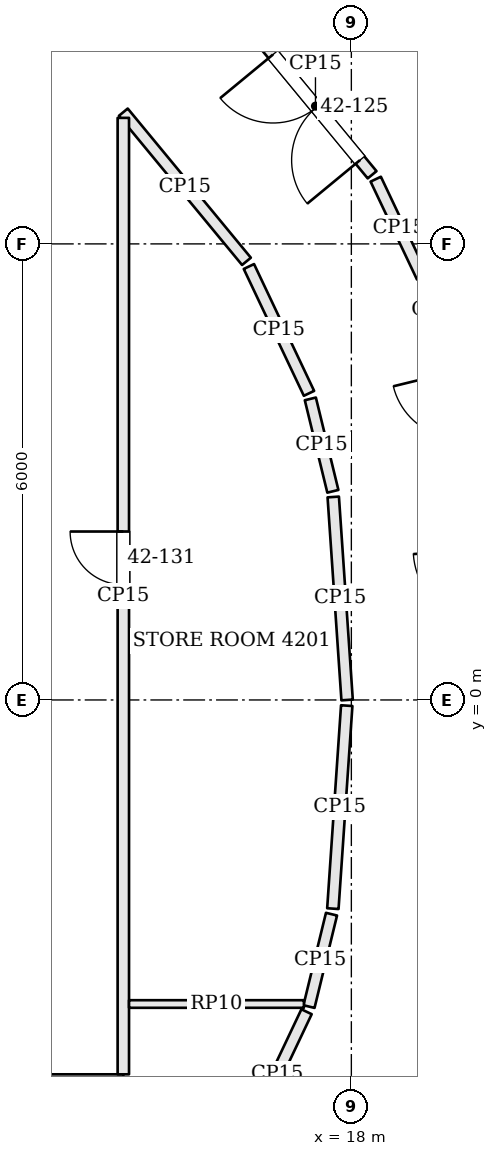
"""IFC4 building model, lengths in metres.
Left out: names, types, materials, properties, quantities, classifications, styles, units other than length and angle.
Written with IfcOpenShell. Run it as: python <this file> out.ifc"""

import sys

from ifc_helpers import new_model, si_unit, direction, frame, frame_2d, origin, place, context, subcontext, project, spatial, rectangle, extrude, element, fill, save


model = new_model("IFC4")
c1 = context("Model", 3, precision=1e-05, world=origin(), true_north=direction((0.0, 1.0)))
c2 = subcontext(c1, "Body", "Model", "MODEL_VIEW")
j1 = project(units=[si_unit("LENGTHUNIT", "METRE"), si_unit("PLANEANGLEUNIT", "RADIAN")], contexts=[c1])
p1 = place(None, origin())
s1 = spatial("IfcSite", under=j1, at=p1, CompositionType="ELEMENT")
p2 = place(p1, origin())
s2 = spatial("IfcBuilding", under=s1, at=p2, CompositionType="ELEMENT")
p3 = place(p2, frame((0.0, 0.0, 174.0)))
s3 = spatial("IfcBuildingStorey", under=s2, at=p3, CompositionType="ELEMENT", Elevation=174.0)
p4 = place(p3, frame((18.931, 5.563, 0.0), z_axis=(0.0, 0.0, 1.0), x_axis=(-0.428204145682, 0.903682029046, 0.0)))
e1 = element("IfcWall", 1, at=p4, inside=s3, PredefinedType="PARTITIONING", context=c2, shape_type="SweptSolid", body=[
    extrude(rectangle(XDim=1.425, YDim=0.15, at=frame_2d((0.713, 0.0))), origin(), (0.0, 0.0, 1.0), 3.084),
])
p5 = place(p3, frame((18.273, 6.909, 0.0), z_axis=(0.0, 0.0, 1.0), x_axis=(-0.63653648943, 0.771246586783, 0.0)))
e2 = element("IfcWall", 2, at=p5, inside=s3, PredefinedType="PARTITIONING", context=c2, shape_type="SweptSolid", body=[
    extrude(rectangle(XDim=2.342, YDim=0.15, at=frame_2d((1.171, 0.0))), origin(), (0.0, 0.0, 1.0), 3.084),
])
p6 = place(p5, frame((0.25, 0.0, 0.0)))
e3 = element("IfcOpeningElement", 3, at=p6, cuts=e2, PredefinedType="OPENING", context=c2, shape_type="SweptSolid", body=[
    extrude(rectangle(XDim=1.8, YDim=2.1, at=frame_2d((0.9, 1.05))), frame((0.0, 0.085, 0.0), z_axis=(0.0, -1.0, 0.0), x_axis=(1.0, 0.0, 0.0)), (0.0, 0.0, 1.0), 0.17),
])
p7 = place(p3, frame((15.0, 7.733, 0.0), z_axis=(0.0, 0.0, 1.0), x_axis=(0.636601263488, -0.771193121938, 0.0)))
e4 = element("IfcWall", 4, at=p7, inside=s3, PredefinedType="PARTITIONING", context=c2, shape_type="SweptSolid", body=[
    extrude(rectangle(XDim=2.545, YDim=0.15, at=frame_2d((1.272, 0.0))), origin(), (0.0, 0.0, 1.0), 3.084),
])
p8 = place(p3, frame((16.652, 5.702, 0.0), z_axis=(0.0, 0.0, 1.0), x_axis=(0.428126129773, -0.903718992279, 0.0)))
e5 = element("IfcWall", 5, at=p8, inside=s3, PredefinedType="PARTITIONING", context=c2, shape_type="SweptSolid", body=[
    extrude(rectangle(XDim=1.846, YDim=0.15, at=frame_2d((0.923, 0.0))), origin(), (0.0, 0.0, 1.0), 3.084),
])
p9 = place(p3, frame((17.46, 3.961, 0.0), z_axis=(0.0, 0.0, 1.0), x_axis=(0.236655249498, -0.971593687137, 0.0)))
e6 = element("IfcWall", 6, at=p9, inside=s3, PredefinedType="PARTITIONING", context=c2, shape_type="SweptSolid", body=[
    extrude(rectangle(XDim=1.251, YDim=0.15, at=frame_2d((0.626, 0.0))), origin(), (0.0, 0.0, 1.0), 3.084),
])
p10 = place(p3, frame((17.762, 2.67, 0.0), z_axis=(0.0, 0.0, 1.0), x_axis=(0.068135311644, -0.997676089373, 0.0)))
e7 = element("IfcWall", 7, at=p10, inside=s3, PredefinedType="PARTITIONING", context=c2, shape_type="SweptSolid", body=[
    extrude(rectangle(XDim=2.677, YDim=0.15, at=frame_2d((1.338, 0.0))), origin(), (0.0, 0.0, 1.0), 3.084),
])
p11 = place(p3, frame((17.939, -0.075, 0.0), z_axis=(0.0, 0.0, 1.0), x_axis=(-0.068226099283, -0.99766988497, 0.0)))
e8 = element("IfcWall", 8, at=p11, inside=s3, PredefinedType="PARTITIONING", context=c2, shape_type="SweptSolid", body=[
    extrude(rectangle(XDim=2.677, YDim=0.15, at=frame_2d((1.338, 0.0))), origin(), (0.0, 0.0, 1.0), 3.084),
])
p12 = place(p3, frame((17.739, -2.818, 0.0), z_axis=(0.0, 0.0, 1.0), x_axis=(-0.236884307907, -0.971537865792, 0.0)))
e9 = element("IfcWall", 9, at=p12, inside=s3, PredefinedType="PARTITIONING", context=c2, shape_type="SweptSolid", body=[
    extrude(rectangle(XDim=1.251, YDim=0.15, at=frame_2d((0.625, 0.0))), origin(), (0.0, 0.0, 1.0), 3.084),
])
p13 = place(p3, frame((17.41, -4.102, 0.0), z_axis=(0.0, 0.0, 1.0), x_axis=(-0.428074720318, -0.903743345107, 0.0)))
e10 = element("IfcWall", 10, at=p13, inside=s3, PredefinedType="PARTITIONING", context=c2, shape_type="SweptSolid", body=[
    extrude(rectangle(XDim=1.806, YDim=0.15, at=frame_2d((0.903, 0.0))), origin(), (0.0, 0.0, 1.0), 3.084),
])
p14 = place(p3, frame((-14.925, -5.0, 0.0), z_axis=(0.0, 0.0, 1.0), x_axis=(1.0, 0.0, 0.0)))
e11 = element("IfcWall", 11, at=p14, inside=s3, PredefinedType="PARTITIONING", context=c2, shape_type="SweptSolid", body=[
    extrude(rectangle(XDim=29.925, YDim=0.15, at=frame_2d((14.962, 0.0))), origin(), (0.0, 0.0, 1.0), 3.084),
])
p15 = place(p14, frame((2.175, 0.0, 0.0)))
e12 = element("IfcOpeningElement", 12, at=p15, cuts=e11, PredefinedType="OPENING", context=c2, shape_type="SweptSolid", body=[
    extrude(rectangle(XDim=1.0, YDim=2.1, at=frame_2d((0.5, 1.05))), frame((0.0, 0.085, 0.0), z_axis=(0.0, -1.0, 0.0), x_axis=(1.0, 0.0, 0.0)), (0.0, 0.0, 1.0), 0.17),
])
p16 = place(p14, frame((14.025, 0.0, 0.0)))
e13 = element("IfcOpeningElement", 13, at=p16, cuts=e11, PredefinedType="OPENING", context=c2, shape_type="SweptSolid", body=[
    extrude(rectangle(XDim=1.8, YDim=2.1, at=frame_2d((0.9, 1.05))), frame((0.0, 0.085, 0.0), z_axis=(0.0, -1.0, 0.0), x_axis=(1.0, 0.0, 0.0)), (0.0, 0.0, 1.0), 0.17),
])
p17 = place(p14, frame((26.675, 0.0, 0.0)))
e14 = element("IfcOpeningElement", 14, at=p17, cuts=e11, PredefinedType="OPENING", context=c2, shape_type="SweptSolid", body=[
    extrude(rectangle(XDim=1.0, YDim=2.1, at=frame_2d((0.5, 1.05))), frame((0.0, 0.085, 0.0), z_axis=(0.0, -1.0, 0.0), x_axis=(1.0, 0.0, 0.0)), (0.0, 0.0, 1.0), 0.17),
])
p18 = place(p3, frame((15.0, -4.925, 0.0), z_axis=(0.0, 0.0, 1.0), x_axis=(0.0, 1.0, 0.0)))
e15 = element("IfcWall", 15, at=p18, inside=s3, PredefinedType="PARTITIONING", context=c2, shape_type="SweptSolid", body=[
    extrude(rectangle(XDim=12.583, YDim=0.15, at=frame_2d((6.292, 0.0))), origin(), (0.0, 0.0, 1.0), 3.084),
])
p19 = place(p18, frame((6.441, 0.0, 0.0)))
e16 = element("IfcOpeningElement", 16, at=p19, cuts=e15, PredefinedType="OPENING", context=c2, shape_type="SweptSolid", body=[
    extrude(rectangle(XDim=0.7, YDim=2.1, at=frame_2d((0.35, 1.05))), frame((0.0, 0.085, 0.0), z_axis=(0.0, -1.0, 0.0), x_axis=(1.0, 0.0, 0.0)), (0.0, 0.0, 1.0), 0.17),
])
p20 = place(p3, frame((15.075, -4.0, 0.0), z_axis=(0.0, 0.0, 1.0), x_axis=(1.0, 0.0, 0.0)))
e17 = element("IfcWall", 17, at=p20, inside=s3, PredefinedType="PARTITIONING", context=c2, shape_type="SweptSolid", body=[
    extrude(rectangle(XDim=2.301, YDim=0.1, at=frame_2d((1.15, 0.0))), origin(), (0.0, 0.0, 1.0), 3.084),
])
p21 = place(p6, origin())
e18 = element("IfcDoor", 18, at=p21, inside=s3, OperationType="DOUBLE_DOOR_SINGLE_SWING", PredefinedType="DOOR", context=c2, shape_type="SweptSolid", body=[
    extrude(rectangle(XDim=1.8, YDim=2.1, at=frame_2d((0.9, 1.05))), frame((0.0, 0.025, 0.0), z_axis=(0.0, -1.0, 0.0), x_axis=(1.0, 0.0, 0.0)), (0.0, 0.0, 1.0), 0.05),
])
fill(e3, e18)
p22 = place(p19, origin())
e19 = element("IfcDoor", 19, at=p22, inside=s3, OperationType="SINGLE_SWING_RIGHT", PredefinedType="DOOR", context=c2, shape_type="SweptSolid", body=[
    extrude(rectangle(XDim=0.7, YDim=2.1, at=frame_2d((0.35, 1.05))), frame((0.0, 0.025, 0.0), z_axis=(0.0, -1.0, 0.0), x_axis=(1.0, 0.0, 0.0)), (0.0, 0.0, 1.0), 0.05),
])
fill(e16, e19)
save(model, sys.argv[1])
